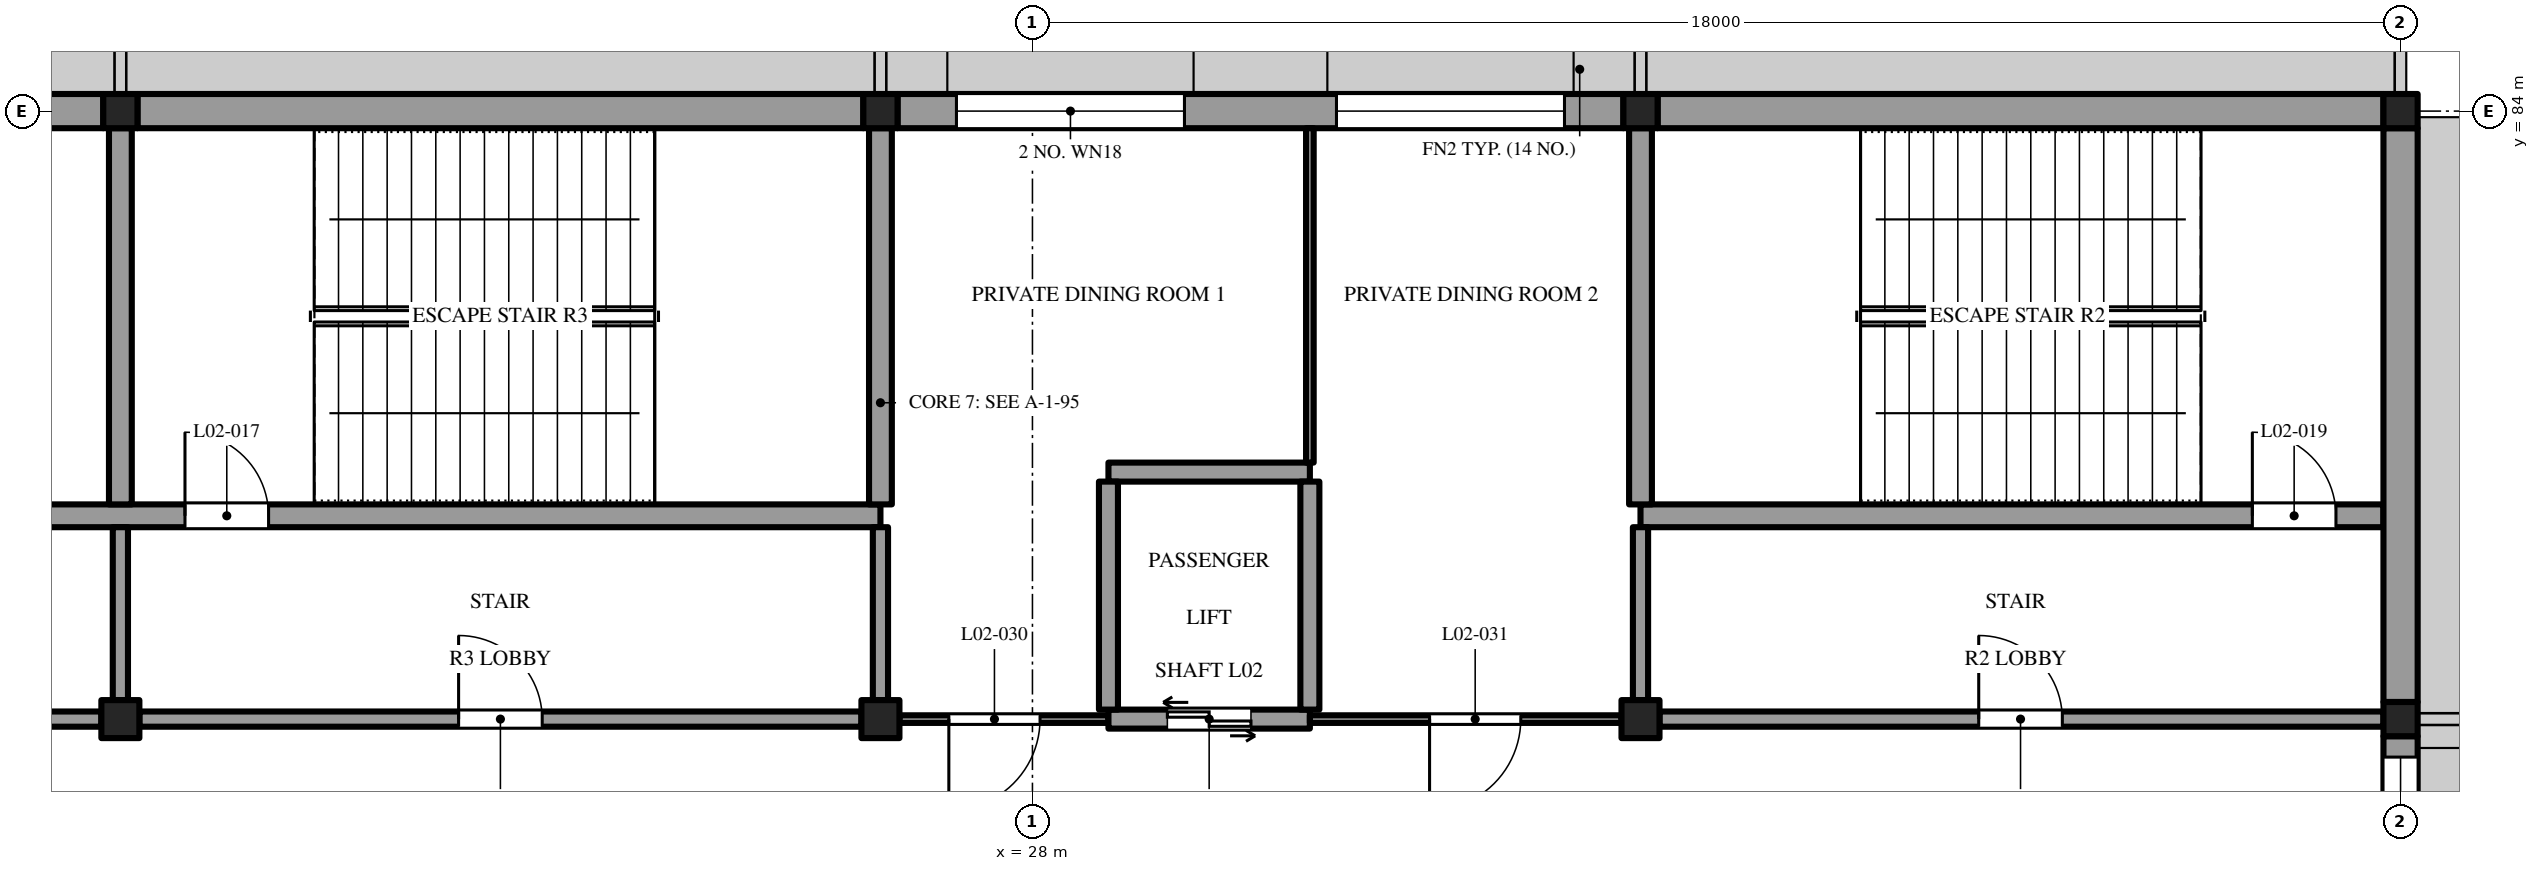
"""IFC4 building model, lengths in metres.
Left out: names, types, materials, properties, quantities, classifications, styles, units other than length and angle.
Written with IfcOpenShell. Run it as: python <this file> out.ifc"""

import sys

from ifc_helpers import new_model, si_unit, direction, frame, frame_2d, origin, origin_2d, place, context, subcontext, project, spatial, rectangle, extrude, element, fill, save


model = new_model("IFC4")
c1 = context("Model", 3, precision=1e-05, world=origin(), true_north=direction((0.0, 1.0)))
c2 = subcontext(c1, "Body", "Model", "MODEL_VIEW")
j1 = project(units=[si_unit("LENGTHUNIT", "METRE"), si_unit("PLANEANGLEUNIT", "RADIAN")], contexts=[c1])
p1 = place(None, origin())
s1 = spatial("IfcSite", under=j1, at=p1, CompositionType="ELEMENT")
p2 = place(p1, origin())
s2 = spatial("IfcBuilding", under=s1, at=p2, CompositionType="ELEMENT")
p3 = place(p2, frame((0.0, 0.0, 12.0)))
s3 = spatial("IfcBuildingStorey", under=s2, at=p3, CompositionType="ELEMENT", Elevation=12.0)
p4 = place(p3, frame((16.0, 76.0, 0.0), z_axis=(0.0, 0.0, 1.0), x_axis=(1.0, 0.0, 0.0)))
e1 = element("IfcColumn", 1, at=p4, inside=s3, PredefinedType="COLUMN", context=c2, shape_type="SweptSolid", body=[
    extrude(rectangle(XDim=0.5, YDim=0.5, at=origin_2d()), origin(), (0.0, 0.0, 1.0), 4.8),
])
p5 = place(p3, frame((16.0, 84.0, 0.0), z_axis=(0.0, 0.0, 1.0), x_axis=(1.0, 0.0, 0.0)))
e2 = element("IfcColumn", 2, at=p5, inside=s3, PredefinedType="COLUMN", context=c2, shape_type="SweptSolid", body=[
    extrude(rectangle(XDim=0.45, YDim=0.45, at=origin_2d()), origin(), (0.0, 0.0, 1.0), 4.8),
])
p6 = place(p3, frame((26.0, 76.0, 0.0), z_axis=(0.0, 0.0, 1.0), x_axis=(1.0, 0.0, 0.0)))
e3 = element("IfcColumn", 3, at=p6, inside=s3, PredefinedType="COLUMN", context=c2, shape_type="SweptSolid", body=[
    extrude(rectangle(XDim=0.5, YDim=0.5, at=origin_2d()), origin(), (0.0, 0.0, 1.0), 4.8),
])
p7 = place(p3, frame((26.0, 84.0, 0.0), z_axis=(0.0, 0.0, 1.0), x_axis=(1.0, 0.0, 0.0)))
e4 = element("IfcColumn", 4, at=p7, inside=s3, PredefinedType="COLUMN", context=c2, shape_type="SweptSolid", body=[
    extrude(rectangle(XDim=0.45, YDim=0.45, at=origin_2d()), origin(), (0.0, 0.0, 1.0), 4.8),
])
p8 = place(p3, frame((36.0, 76.0, 0.0), z_axis=(0.0, 0.0, 1.0), x_axis=(1.0, 0.0, 0.0)))
e5 = element("IfcColumn", 5, at=p8, inside=s3, PredefinedType="COLUMN", context=c2, shape_type="SweptSolid", body=[
    extrude(rectangle(XDim=0.5, YDim=0.5, at=origin_2d()), origin(), (0.0, 0.0, 1.0), 4.8),
])
for number, where, z_axis, x_axis in (
    (6, (36.0, 84.0, 0.0), (0.0, 0.0, 1.0), (1.0, 0.0, 0.0)),
    (7, (46.0, 76.0, 0.0), (0.0, 0.0, 1.0), (1.0, 0.0, 0.0)),
    (8, (46.0, 84.0, 0.0), (0.0, 0.0, 1.0), (1.0, 0.0, 0.0)),
):
    element("IfcColumn", number, at=place(p3, frame(where, z_axis=z_axis, x_axis=x_axis)), inside=s3, PredefinedType="COLUMN", context=c2, shape_type="SweptSolid", body=[
        extrude(rectangle(XDim=0.45, YDim=0.45, at=origin_2d()), origin(), (0.0, 0.0, 1.0), 4.8),
    ])
p9 = place(p3, frame((6.225, 76.0, 0.0), z_axis=(0.0, 0.0, 1.0), x_axis=(1.0, 0.0, 0.0)))
e9 = element("IfcWall", 9, at=p9, inside=s3, PredefinedType="SOLIDWALL", context=c2, shape_type="SweptSolid", body=[
    extrude(rectangle(XDim=9.525, YDim=0.2, at=frame_2d((4.762, 0.0))), origin(), (0.0, 0.0, 1.0), 4.45),
])
p10 = place(p9, frame((7.325, 0.0, 0.0)))
e10 = element("IfcOpeningElement", 10, at=p10, cuts=e9, PredefinedType="OPENING", context=c2, shape_type="SweptSolid", body=[
    extrude(rectangle(XDim=1.1, YDim=2.1, at=frame_2d((0.55, 1.05))), frame((0.0, 0.11, 0.0), z_axis=(0.0, -1.0, 0.0), x_axis=(1.0, 0.0, 0.0)), (0.0, 0.0, 1.0), 0.22),
])
p11 = place(p3, frame((16.25, 76.0, 0.0), z_axis=(0.0, 0.0, 1.0), x_axis=(1.0, 0.0, 0.0)))
e11 = element("IfcWall", 11, at=p11, inside=s3, PredefinedType="SOLIDWALL", context=c2, shape_type="SweptSolid", body=[
    extrude(rectangle(XDim=9.5, YDim=0.2, at=frame_2d((4.75, 0.0))), origin(), (0.0, 0.0, 1.0), 4.45),
])
p12 = place(p11, frame((4.2, 0.0, 0.0)))
e12 = element("IfcOpeningElement", 12, at=p12, cuts=e11, PredefinedType="OPENING", context=c2, shape_type="SweptSolid", body=[
    extrude(rectangle(XDim=1.1, YDim=2.1, at=frame_2d((0.55, 1.05))), frame((0.0, 0.11, 0.0), z_axis=(0.0, -1.0, 0.0), x_axis=(1.0, 0.0, 0.0)), (0.0, 0.0, 1.0), 0.22),
])
p13 = place(p3, frame((26.25, 76.0, 0.0), z_axis=(0.0, 0.0, 1.0), x_axis=(1.0, 0.0, 0.0)))
e13 = element("IfcWall", 13, at=p13, inside=s3, PredefinedType="PARTITIONING", context=c2, shape_type="SweptSolid", body=[
    extrude(rectangle(XDim=2.75, YDim=0.1, at=frame_2d((1.375, 0.0))), origin(), (0.0, 0.0, 1.0), 4.45),
])
p14 = place(p13, frame((0.65, 0.0, 0.0)))
e14 = element("IfcOpeningElement", 14, at=p14, cuts=e13, PredefinedType="OPENING", context=c2, shape_type="SweptSolid", body=[
    extrude(rectangle(XDim=1.2, YDim=2.1, at=frame_2d((0.6, 1.05))), frame((0.0, 0.06, 0.0), z_axis=(0.0, -1.0, 0.0), x_axis=(1.0, 0.0, 0.0)), (0.0, 0.0, 1.0), 0.12),
])
p15 = place(p3, frame((29.0, 76.0, 0.0), z_axis=(0.0, 0.0, 1.0), x_axis=(1.0, 0.0, 0.0)))
e15 = element("IfcWall", 15, at=p15, inside=s3, PredefinedType="SOLIDWALL", context=c2, shape_type="SweptSolid", body=[
    extrude(rectangle(XDim=2.65, YDim=0.25, at=frame_2d((1.325, 0.0))), origin(), (0.0, 0.0, 1.0), 4.45),
])
p16 = place(p15, frame((0.775, 0.0, 0.0)))
e16 = element("IfcOpeningElement", 16, at=p16, cuts=e15, PredefinedType="OPENING", context=c2, shape_type="SweptSolid", body=[
    extrude(rectangle(XDim=1.1, YDim=2.1, at=frame_2d((0.55, 1.05))), frame((0.0, 0.135, 0.0), z_axis=(0.0, -1.0, 0.0), x_axis=(1.0, 0.0, 0.0)), (0.0, 0.0, 1.0), 0.27),
])
p17 = place(p3, frame((31.65, 76.0, 0.0), z_axis=(0.0, 0.0, 1.0), x_axis=(1.0, 0.0, 0.0)))
e17 = element("IfcWall", 17, at=p17, inside=s3, PredefinedType="PARTITIONING", context=c2, shape_type="SweptSolid", body=[
    extrude(rectangle(XDim=4.1, YDim=0.1, at=frame_2d((2.05, 0.0))), origin(), (0.0, 0.0, 1.0), 4.45),
])
p18 = place(p17, frame((1.575, 0.0, 0.0)))
e18 = element("IfcOpeningElement", 18, at=p18, cuts=e17, PredefinedType="OPENING", context=c2, shape_type="SweptSolid", body=[
    extrude(rectangle(XDim=1.2, YDim=2.1, at=frame_2d((0.6, 1.05))), frame((0.0, 0.06, 0.0), z_axis=(0.0, -1.0, 0.0), x_axis=(1.0, 0.0, 0.0)), (0.0, 0.0, 1.0), 0.12),
])
p19 = place(p3, frame((36.25, 76.0, 0.0), z_axis=(0.0, 0.0, 1.0), x_axis=(1.0, 0.0, 0.0)))
e19 = element("IfcWall", 19, at=p19, inside=s3, PredefinedType="SOLIDWALL", context=c2, shape_type="SweptSolid", body=[
    extrude(rectangle(XDim=9.525, YDim=0.2, at=frame_2d((4.762, 0.0))), origin(), (0.0, 0.0, 1.0), 4.45),
])
p20 = place(p19, frame((4.2, 0.0, 0.0)))
e20 = element("IfcOpeningElement", 20, at=p20, cuts=e19, PredefinedType="OPENING", context=c2, shape_type="SweptSolid", body=[
    extrude(rectangle(XDim=1.1, YDim=2.1, at=frame_2d((0.55, 1.05))), frame((0.0, 0.11, 0.0), z_axis=(0.0, -1.0, 0.0), x_axis=(1.0, 0.0, 0.0)), (0.0, 0.0, 1.0), 0.22),
])
p21 = place(p3, frame((6.225, 78.675, 0.0), z_axis=(0.0, 0.0, 1.0), x_axis=(1.0, 0.0, 0.0)))
e21 = element("IfcWall", 21, at=p21, inside=s3, PredefinedType="SHEAR", context=c2, shape_type="SweptSolid", body=[
    extrude(rectangle(XDim=19.775, YDim=0.3, at=frame_2d((9.887, 0.0))), origin(), (0.0, 0.0, 1.0), 4.45),
])
p22 = place(p21, frame((0.625, 0.0, 0.0)))
e22 = element("IfcOpeningElement", 22, at=p22, cuts=e21, PredefinedType="OPENING", context=c2, shape_type="SweptSolid", body=[
    extrude(rectangle(XDim=1.1, YDim=2.1, at=frame_2d((0.55, 1.05))), frame((0.0, 0.16, 0.0), z_axis=(0.0, -1.0, 0.0), x_axis=(1.0, 0.0, 0.0)), (0.0, 0.0, 1.0), 0.32),
])
p23 = place(p21, frame((10.625, 0.0, 0.0)))
e23 = element("IfcOpeningElement", 23, at=p23, cuts=e21, PredefinedType="OPENING", context=c2, shape_type="SweptSolid", body=[
    extrude(rectangle(XDim=1.1, YDim=2.1, at=frame_2d((0.55, 1.05))), frame((0.0, 0.16, 0.0), z_axis=(0.0, -1.0, 0.0), x_axis=(1.0, 0.0, 0.0)), (0.0, 0.0, 1.0), 0.32),
])
p24 = place(p3, frame((36.0, 78.675, 0.0), z_axis=(0.0, 0.0, 1.0), x_axis=(1.0, 0.0, 0.0)))
e24 = element("IfcWall", 24, at=p24, inside=s3, PredefinedType="SHEAR", context=c2, shape_type="SweptSolid", body=[
    extrude(rectangle(XDim=9.775, YDim=0.3, at=frame_2d((4.887, 0.0))), origin(), (0.0, 0.0, 1.0), 4.45),
])
p25 = place(p24, frame((8.05, 0.0, 0.0)))
e25 = element("IfcOpeningElement", 25, at=p25, cuts=e24, PredefinedType="OPENING", context=c2, shape_type="SweptSolid", body=[
    extrude(rectangle(XDim=1.1, YDim=2.1, at=frame_2d((0.55, 1.05))), frame((0.0, 0.16, 0.0), z_axis=(0.0, -1.0, 0.0), x_axis=(1.0, 0.0, 0.0)), (0.0, 0.0, 1.0), 0.32),
])
p26 = place(p3, frame((29.0, 79.25, 0.0), z_axis=(0.0, 0.0, 1.0), x_axis=(1.0, 0.0, 0.0)))
e26 = element("IfcWall", 26, at=p26, inside=s3, PredefinedType="SOLIDWALL", context=c2, shape_type="SweptSolid", body=[
    extrude(rectangle(XDim=2.65, YDim=0.25, at=frame_2d((1.325, 0.0))), origin(), (0.0, 0.0, 1.0), 4.45),
])
for number, where, z_axis, x_axis in (
    (27, (15.775, 84.0, 0.0), (0.0, 0.0, 1.0), (-1.0, 0.0, 0.0)),
    (28, (25.775, 84.0, 0.0), (0.0, 0.0, 1.0), (-1.0, 0.0, 0.0)),
):
    element("IfcWall", number, at=place(p3, frame(where, z_axis=z_axis, x_axis=x_axis)), inside=s3, PredefinedType="SOLIDWALL", context=c2, shape_type="SweptSolid", body=[
        extrude(rectangle(XDim=9.55, YDim=0.45, at=frame_2d((4.775, 0.0))), origin(), (0.0, 0.0, 1.0), 4.45),
    ])
p27 = place(p3, frame((35.775, 84.0, 0.0), z_axis=(0.0, 0.0, 1.0), x_axis=(-1.0, 0.0, 0.0)))
e29 = element("IfcWall", 29, at=p27, inside=s3, PredefinedType="SOLIDWALL", context=c2, shape_type="SweptSolid", body=[
    extrude(rectangle(XDim=9.55, YDim=0.45, at=frame_2d((4.775, 0.0))), origin(), (0.0, 0.0, 1.0), 4.45),
])
p28 = place(p27, frame((5.775, 0.0, 0.6)))
e30 = element("IfcOpeningElement", 30, at=p28, cuts=e29, PredefinedType="OPENING", context=c2, shape_type="SweptSolid", body=[
    extrude(rectangle(XDim=3.0, YDim=3.2, at=frame_2d((1.5, 1.6))), frame((0.0, 0.235, 0.0), z_axis=(0.0, -1.0, 0.0), x_axis=(1.0, 0.0, 0.0)), (0.0, 0.0, 1.0), 0.47),
])
p29 = place(p27, frame((0.775, 0.0, 0.6)))
e31 = element("IfcOpeningElement", 31, at=p29, cuts=e29, PredefinedType="OPENING", context=c2, shape_type="SweptSolid", body=[
    extrude(rectangle(XDim=3.0, YDim=3.2, at=frame_2d((1.5, 1.6))), frame((0.0, 0.235, 0.0), z_axis=(0.0, -1.0, 0.0), x_axis=(1.0, 0.0, 0.0)), (0.0, 0.0, 1.0), 0.47),
])
p30 = place(p3, frame((45.775, 84.0, 0.0), z_axis=(0.0, 0.0, 1.0), x_axis=(-1.0, 0.0, 0.0)))
e32 = element("IfcWall", 32, at=p30, inside=s3, PredefinedType="SOLIDWALL", context=c2, shape_type="SweptSolid", body=[
    extrude(rectangle(XDim=9.55, YDim=0.45, at=frame_2d((4.775, 0.0))), origin(), (0.0, 0.0, 1.0), 4.45),
])
p31 = place(p3, frame((16.0, 76.25, 0.0), z_axis=(0.0, 0.0, 1.0), x_axis=(0.0, 1.0, 0.0)))
e33 = element("IfcWall", 33, at=p31, inside=s3, PredefinedType="SOLIDWALL", context=c2, shape_type="SweptSolid", body=[
    extrude(rectangle(XDim=2.275, YDim=0.2, at=frame_2d((1.137, 0.0))), origin(), (0.0, 0.0, 1.0), 4.45),
])
p32 = place(p3, frame((16.0, 78.825, 0.0), z_axis=(0.0, 0.0, 1.0), x_axis=(0.0, 1.0, 0.0)))
e34 = element("IfcWall", 34, at=p32, inside=s3, PredefinedType="SHEAR", context=c2, shape_type="SweptSolid", body=[
    extrude(rectangle(XDim=4.95, YDim=0.3, at=frame_2d((2.475, 0.0))), origin(), (0.0, 0.0, 1.0), 4.45),
])
p33 = place(p3, frame((26.0, 76.25, 0.0), z_axis=(0.0, 0.0, 1.0), x_axis=(0.0, 1.0, 0.0)))
e35 = element("IfcWall", 35, at=p33, inside=s3, PredefinedType="SOLIDWALL", context=c2, shape_type="SweptSolid", body=[
    extrude(rectangle(XDim=2.275, YDim=0.2, at=frame_2d((1.137, 0.0))), origin(), (0.0, 0.0, 1.0), 4.45),
])
p34 = place(p3, frame((26.0, 78.825, 0.0), z_axis=(0.0, 0.0, 1.0), x_axis=(0.0, 1.0, 0.0)))
e36 = element("IfcWall", 36, at=p34, inside=s3, PredefinedType="SHEAR", context=c2, shape_type="SweptSolid", body=[
    extrude(rectangle(XDim=4.95, YDim=0.3, at=frame_2d((2.475, 0.0))), origin(), (0.0, 0.0, 1.0), 4.45),
])
for number, where, z_axis, x_axis in (
    (37, (29.0, 76.125, 0.0), (0.0, 0.0, 1.0), (0.0, 1.0, 0.0)),
    (38, (31.65, 76.125, 0.0), (0.0, 0.0, 1.0), (0.0, 1.0, 0.0)),
):
    element("IfcWall", number, at=place(p3, frame(where, z_axis=z_axis, x_axis=x_axis)), inside=s3, PredefinedType="SOLIDWALL", context=c2, shape_type="SweptSolid", body=[
        extrude(rectangle(XDim=3.0, YDim=0.25, at=frame_2d((1.5, 0.0))), origin(), (0.0, 0.0, 1.0), 4.45),
    ])
p35 = place(p3, frame((31.65, 79.375, 0.0), z_axis=(0.0, 0.0, 1.0), x_axis=(0.0, 1.0, 0.0)))
e39 = element("IfcWall", 39, at=p35, inside=s3, PredefinedType="PARTITIONING", context=c2, shape_type="SweptSolid", body=[
    extrude(rectangle(XDim=4.4, YDim=0.1, at=frame_2d((2.2, 0.0))), origin(), (0.0, 0.0, 1.0), 4.45),
])
p36 = place(p3, frame((36.0, 76.25, 0.0), z_axis=(0.0, 0.0, 1.0), x_axis=(0.0, 1.0, 0.0)))
e40 = element("IfcWall", 40, at=p36, inside=s3, PredefinedType="SOLIDWALL", context=c2, shape_type="SweptSolid", body=[
    extrude(rectangle(XDim=2.275, YDim=0.2, at=frame_2d((1.137, 0.0))), origin(), (0.0, 0.0, 1.0), 4.45),
])
p37 = place(p3, frame((36.0, 78.825, 0.0), z_axis=(0.0, 0.0, 1.0), x_axis=(0.0, 1.0, 0.0)))
e41 = element("IfcWall", 41, at=p37, inside=s3, PredefinedType="SHEAR", context=c2, shape_type="SweptSolid", body=[
    extrude(rectangle(XDim=4.95, YDim=0.3, at=frame_2d((2.475, 0.0))), origin(), (0.0, 0.0, 1.0), 4.45),
])
p38 = place(p3, frame((46.0, 68.225, 0.0), z_axis=(0.0, 0.0, 1.0), x_axis=(0.0, 1.0, 0.0)))
e42 = element("IfcWall", 42, at=p38, inside=s3, PredefinedType="SOLIDWALL", context=c2, shape_type="SweptSolid", body=[
    extrude(rectangle(XDim=7.55, YDim=0.45, at=frame_2d((3.775, 0.0))), origin(), (0.0, 0.0, 1.0), 4.45),
])
p39 = place(p38, frame((0.275, 0.0, 0.6)))
e43 = element("IfcOpeningElement", 43, at=p39, cuts=e42, PredefinedType="OPENING", context=c2, shape_type="SweptSolid", body=[
    extrude(rectangle(XDim=3.0, YDim=3.2, at=frame_2d((1.5, 1.6))), frame((0.0, 0.235, 0.0), z_axis=(0.0, -1.0, 0.0), x_axis=(1.0, 0.0, 0.0)), (0.0, 0.0, 1.0), 0.47),
])
p40 = place(p38, frame((4.275, 0.0, 0.6)))
e44 = element("IfcOpeningElement", 44, at=p40, cuts=e42, PredefinedType="OPENING", context=c2, shape_type="SweptSolid", body=[
    extrude(rectangle(XDim=3.0, YDim=3.2, at=frame_2d((1.5, 1.6))), frame((0.0, 0.235, 0.0), z_axis=(0.0, -1.0, 0.0), x_axis=(1.0, 0.0, 0.0)), (0.0, 0.0, 1.0), 0.47),
])
p41 = place(p3, frame((46.0, 76.225, 0.0), z_axis=(0.0, 0.0, 1.0), x_axis=(0.0, 1.0, 0.0)))
e45 = element("IfcWall", 45, at=p41, inside=s3, PredefinedType="SOLIDWALL", context=c2, shape_type="SweptSolid", body=[
    extrude(rectangle(XDim=7.55, YDim=0.45, at=frame_2d((3.775, 0.0))), origin(), (0.0, 0.0, 1.0), 4.45),
])
p42 = place(p12, origin())
e46 = element("IfcDoor", 46, at=p42, inside=s3, OperationType="SINGLE_SWING_LEFT", PredefinedType="DOOR", context=c2, shape_type="SweptSolid", body=[
    extrude(rectangle(XDim=1.1, YDim=2.1, at=frame_2d((0.55, 1.05))), frame((0.0, 0.025, 0.0), z_axis=(0.0, -1.0, 0.0), x_axis=(1.0, 0.0, 0.0)), (0.0, 0.0, 1.0), 0.05),
])
fill(e12, e46)
p43 = place(p23, origin())
e47 = element("IfcDoor", 47, at=p43, inside=s3, OperationType="SINGLE_SWING_RIGHT", PredefinedType="DOOR", context=c2, shape_type="SweptSolid", body=[
    extrude(rectangle(XDim=1.1, YDim=2.1, at=frame_2d((0.55, 1.05))), frame((0.0, 0.025, 0.0), z_axis=(0.0, -1.0, 0.0), x_axis=(1.0, 0.0, 0.0)), (0.0, 0.0, 1.0), 0.05),
])
fill(e23, e47)
p44 = place(p20, origin())
e48 = element("IfcDoor", 48, at=p44, inside=s3, OperationType="SINGLE_SWING_LEFT", PredefinedType="DOOR", context=c2, shape_type="SweptSolid", body=[
    extrude(rectangle(XDim=1.1, YDim=2.1, at=frame_2d((0.55, 1.05))), frame((0.0, 0.025, 0.0), z_axis=(0.0, -1.0, 0.0), x_axis=(1.0, 0.0, 0.0)), (0.0, 0.0, 1.0), 0.05),
])
fill(e20, e48)
p45 = place(p25, origin())
e49 = element("IfcDoor", 49, at=p45, inside=s3, OperationType="SINGLE_SWING_RIGHT", PredefinedType="DOOR", context=c2, shape_type="SweptSolid", body=[
    extrude(rectangle(XDim=1.1, YDim=2.1, at=frame_2d((0.55, 1.05))), frame((0.0, 0.025, 0.0), z_axis=(0.0, -1.0, 0.0), x_axis=(1.0, 0.0, 0.0)), (0.0, 0.0, 1.0), 0.05),
])
fill(e25, e49)
p46 = place(p14, frame((1.2, 0.0, 0.0), z_axis=(0.0, 0.0, 1.0), x_axis=(-1.0, 0.0, 0.0)))
e50 = element("IfcDoor", 50, at=p46, inside=s3, OperationType="SINGLE_SWING_RIGHT", PredefinedType="DOOR", context=c2, shape_type="SweptSolid", body=[
    extrude(rectangle(XDim=1.2, YDim=2.1, at=frame_2d((0.6, 1.05))), frame((0.0, 0.025, 0.0), z_axis=(0.0, -1.0, 0.0), x_axis=(1.0, 0.0, 0.0)), (0.0, 0.0, 1.0), 0.05),
])
fill(e14, e50)
p47 = place(p18, frame((1.2, 0.0, 0.0), z_axis=(0.0, 0.0, 1.0), x_axis=(-1.0, 0.0, 0.0)))
e51 = element("IfcDoor", 51, at=p47, inside=s3, OperationType="SINGLE_SWING_LEFT", PredefinedType="DOOR", context=c2, shape_type="SweptSolid", body=[
    extrude(rectangle(XDim=1.2, YDim=2.1, at=frame_2d((0.6, 1.05))), frame((0.0, 0.025, 0.0), z_axis=(0.0, -1.0, 0.0), x_axis=(1.0, 0.0, 0.0)), (0.0, 0.0, 1.0), 0.05),
])
fill(e18, e51)
p48 = place(p16, frame((1.1, 0.0, 0.0), z_axis=(0.0, 0.0, 1.0), x_axis=(-1.0, 0.0, 0.0)))
e52 = element("IfcDoor", 52, at=p48, inside=s3, OperationType="DOUBLE_DOOR_SLIDING", PredefinedType="DOOR", context=c2, shape_type="SweptSolid", body=[
    extrude(rectangle(XDim=1.1, YDim=2.1, at=frame_2d((0.55, 1.05))), frame((0.0, 0.025, 0.0), z_axis=(0.0, -1.0, 0.0), x_axis=(1.0, 0.0, 0.0)), (0.0, 0.0, 1.0), 0.05),
])
fill(e16, e52)
p49 = place(p28, origin())
e53 = element("IfcWindow", 53, at=p49, inside=s3, PartitioningType="SINGLE_PANEL", PredefinedType="WINDOW", context=c2, shape_type="SweptSolid", body=[
    extrude(rectangle(XDim=3.0, YDim=3.2, at=frame_2d((1.5, 1.6))), frame((0.0, 0.215, 0.0), z_axis=(0.0, -1.0, 0.0), x_axis=(1.0, 0.0, 0.0)), (0.0, 0.0, 1.0), 0.06),
])
fill(e30, e53)
p50 = place(p29, origin())
e54 = element("IfcWindow", 54, at=p50, inside=s3, PartitioningType="SINGLE_PANEL", PredefinedType="WINDOW", context=c2, shape_type="SweptSolid", body=[
    extrude(rectangle(XDim=3.0, YDim=3.2, at=frame_2d((1.5, 1.6))), frame((0.0, 0.215, 0.0), z_axis=(0.0, -1.0, 0.0), x_axis=(1.0, 0.0, 0.0)), (0.0, 0.0, 1.0), 0.06),
])
fill(e31, e54)
p51 = place(p40, origin())
e55 = element("IfcWindow", 55, at=p51, inside=s3, PartitioningType="SINGLE_PANEL", PredefinedType="WINDOW", context=c2, shape_type="SweptSolid", body=[
    extrude(rectangle(XDim=3.0, YDim=3.2, at=frame_2d((1.5, 1.6))), frame((0.0, 0.215, 0.0), z_axis=(0.0, -1.0, 0.0), x_axis=(1.0, 0.0, 0.0)), (0.0, 0.0, 1.0), 0.06),
])
fill(e44, e55)
save(model, sys.argv[1])
